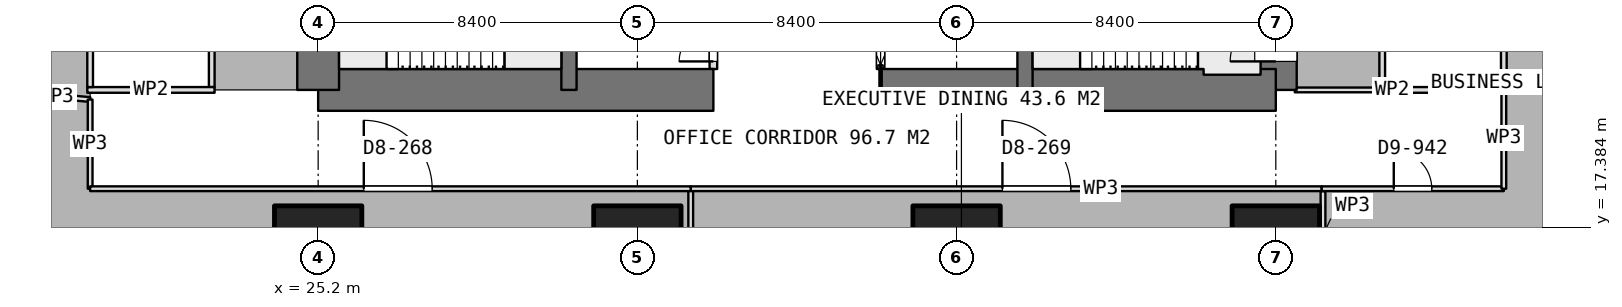
"""IFC4 building model, lengths in metres.
Left out: names, types, materials, properties, quantities, classifications, styles, units other than length and angle.
Written with IfcOpenShell. Run it as: python <this file> out.ifc"""

import sys

from ifc_helpers import new_model, si_unit, direction, frame, frame_2d, origin, origin_2d, place, context, subcontext, project, spatial, rectangle, extrude, element, fill, save


model = new_model("IFC4")
c1 = context("Model", 3, precision=1e-05, world=origin(), true_north=direction((0.0, 1.0)))
c2 = subcontext(c1, "Body", "Model", "MODEL_VIEW")
j1 = project(units=[si_unit("LENGTHUNIT", "METRE"), si_unit("PLANEANGLEUNIT", "RADIAN")], contexts=[c1])
p1 = place(None, origin())
s1 = spatial("IfcSite", under=j1, at=p1, CompositionType="ELEMENT")
p2 = place(p1, origin())
s2 = spatial("IfcBuilding", under=s1, at=p2, CompositionType="ELEMENT")
p3 = place(p2, frame((0.0, 0.0, 250.1)))
s3 = spatial("IfcBuildingStorey", under=s2, at=p3, CompositionType="ELEMENT", Elevation=250.1)
p4 = place(p3, frame((25.2, 21.0, 0.0), z_axis=(0.0, 0.0, 1.0), x_axis=(1.0, 0.0, 0.0)))
e1 = element("IfcWall", 1, at=p4, inside=s3, PredefinedType="SHEAR", context=c2, shape_type="SweptSolid", body=[
    extrude(rectangle(XDim=10.4, YDim=1.1, at=frame_2d((5.2, 0.0))), origin(), (0.0, 0.0, 1.0), 3.75),
])
p5 = place(p3, frame((40.0, 21.0, 0.0), z_axis=(0.0, 0.0, 1.0), x_axis=(1.0, 0.0, 0.0)))
e2 = element("IfcWall", 2, at=p5, inside=s3, PredefinedType="SHEAR", context=c2, shape_type="SweptSolid", body=[
    extrude(rectangle(XDim=10.4, YDim=1.1, at=frame_2d((5.2, 0.0))), origin(), (0.0, 0.0, 1.0), 3.75),
])
p6 = place(p3, frame((25.2, 21.0, 0.0), z_axis=(0.0, 0.0, 1.0), x_axis=(0.0, 1.0, 0.0)))
e3 = element("IfcWall", 3, at=p6, inside=s3, PredefinedType="SHEAR", context=c2, shape_type="SweptSolid", body=[
    extrude(rectangle(XDim=25.2, YDim=1.1, at=frame_2d((12.6, 0.0))), origin(), (0.0, 0.0, 1.0), 3.75),
])
p7 = place(p6, frame((7.8, 0.0, 0.0)))
e4 = element("IfcOpeningElement", 4, at=p7, cuts=e3, PredefinedType="OPENING", context=c2, shape_type="SweptSolid", body=[
    extrude(rectangle(XDim=1.2, YDim=2.1, at=frame_2d((0.6, 1.05))), frame((0.0, 0.56, 0.0), z_axis=(0.0, -1.0, 0.0), x_axis=(1.0, 0.0, 0.0)), (0.0, 0.0, 1.0), 1.12),
])
p8 = place(p6, frame((14.25, 0.0, 0.0)))
e5 = element("IfcOpeningElement", 5, at=p8, cuts=e3, PredefinedType="OPENING", context=c2, shape_type="SweptSolid", body=[
    extrude(rectangle(XDim=0.9, YDim=2.1, at=frame_2d((0.45, 1.05))), frame((0.0, 0.56, 0.0), z_axis=(0.0, -1.0, 0.0), x_axis=(1.0, 0.0, 0.0)), (0.0, 0.0, 1.0), 1.12),
])
p9 = place(p6, frame((16.85, 0.0, 0.0)))
e6 = element("IfcOpeningElement", 6, at=p9, cuts=e3, PredefinedType="OPENING", context=c2, shape_type="SweptSolid", body=[
    extrude(rectangle(XDim=0.9, YDim=2.1, at=frame_2d((0.45, 1.05))), frame((0.0, 0.56, 0.0), z_axis=(0.0, -1.0, 0.0), x_axis=(1.0, 0.0, 0.0)), (0.0, 0.0, 1.0), 1.12),
])
p10 = place(p6, frame((19.0, 0.0, 0.0)))
e7 = element("IfcOpeningElement", 7, at=p10, cuts=e3, PredefinedType="OPENING", context=c2, shape_type="SweptSolid", body=[
    extrude(rectangle(XDim=1.2, YDim=2.1, at=frame_2d((0.6, 1.05))), frame((0.0, 0.56, 0.0), z_axis=(0.0, -1.0, 0.0), x_axis=(1.0, 0.0, 0.0)), (0.0, 0.0, 1.0), 1.12),
])
p11 = place(p3, frame((50.4, 21.0, 0.0), z_axis=(0.0, 0.0, 1.0), x_axis=(0.0, 1.0, 0.0)))
e8 = element("IfcWall", 8, at=p11, inside=s3, PredefinedType="SHEAR", context=c2, shape_type="SweptSolid", body=[
    extrude(rectangle(XDim=25.2, YDim=1.1, at=frame_2d((12.6, 0.0))), origin(), (0.0, 0.0, 1.0), 3.75),
])
p12 = place(p11, frame((16.2, 0.0, 0.0)))
e9 = element("IfcOpeningElement", 9, at=p12, cuts=e8, PredefinedType="OPENING", context=c2, shape_type="SweptSolid", body=[
    extrude(rectangle(XDim=1.2, YDim=2.1, at=frame_2d((0.6, 1.05))), frame((0.0, 0.56, 0.0), z_axis=(0.0, -1.0, 0.0), x_axis=(1.0, 0.0, 0.0)), (0.0, 0.0, 1.0), 1.12),
])
p13 = place(p11, frame((10.05, 0.0, 0.0)))
e10 = element("IfcOpeningElement", 10, at=p13, cuts=e8, PredefinedType="OPENING", context=c2, shape_type="SweptSolid", body=[
    extrude(rectangle(XDim=0.9, YDim=2.1, at=frame_2d((0.45, 1.05))), frame((0.0, 0.56, 0.0), z_axis=(0.0, -1.0, 0.0), x_axis=(1.0, 0.0, 0.0)), (0.0, 0.0, 1.0), 1.12),
])
p14 = place(p11, frame((7.45, 0.0, 0.0)))
e11 = element("IfcOpeningElement", 11, at=p14, cuts=e8, PredefinedType="OPENING", context=c2, shape_type="SweptSolid", body=[
    extrude(rectangle(XDim=0.9, YDim=2.1, at=frame_2d((0.45, 1.05))), frame((0.0, 0.56, 0.0), z_axis=(0.0, -1.0, 0.0), x_axis=(1.0, 0.0, 0.0)), (0.0, 0.0, 1.0), 1.12),
])
p15 = place(p11, frame((0.75, 0.0, 0.0)))
e12 = element("IfcOpeningElement", 12, at=p15, cuts=e8, PredefinedType="OPENING", context=c2, shape_type="SweptSolid", body=[
    extrude(rectangle(XDim=1.2, YDim=2.1, at=frame_2d((0.6, 1.05))), frame((0.0, 0.56, 0.0), z_axis=(0.0, -1.0, 0.0), x_axis=(1.0, 0.0, 0.0)), (0.0, 0.0, 1.0), 1.12),
])
for number, where, z_axis, x_axis in (
    (13, (31.8, 21.0, 0.0), (0.0, 0.0, 1.0), (0.0, 1.0, 0.0)),
    (14, (43.8, 21.0, 0.0), (0.0, 0.0, 1.0), (0.0, 1.0, 0.0)),
):
    element("IfcWall", number, at=place(p3, frame(where, z_axis=z_axis, x_axis=x_axis)), inside=s3, PredefinedType="SHEAR", context=c2, shape_type="SweptSolid", body=[
        extrude(rectangle(XDim=25.2, YDim=0.4, at=frame_2d((12.6, 0.0))), origin(), (0.0, 0.0, 1.0), 3.75),
    ])
for number, where, z_axis, x_axis in (
    (15, (25.2, 16.8, 0.0), (0.0, 0.0, 1.0), (1.0, 0.0, 0.0)),
    (16, (33.6, 16.8, 0.0), (0.0, 0.0, 1.0), (1.0, 0.0, 0.0)),
    (17, (42.0, 16.8, 0.0), (0.0, 0.0, 1.0), (1.0, 0.0, 0.0)),
    (18, (50.4, 16.8, 0.0), (0.0, 0.0, 1.0), (1.0, 0.0, 0.0)),
):
    element("IfcColumn", number, at=place(p3, frame(where, z_axis=z_axis, x_axis=x_axis)), inside=s3, PredefinedType="COLUMN", context=c2, shape_type="SweptSolid", body=[
        extrude(rectangle(XDim=2.3, YDim=2.3, at=origin_2d()), origin(), (0.0, 0.0, 1.0), 3.75),
    ])
p16 = place(p3, frame((40.0, 21.55, 0.0), z_axis=(0.0, 0.0, 1.0), x_axis=(0.0, 1.0, 0.0)))
e19 = element("IfcWall", 19, at=p16, inside=s3, PredefinedType="PARTITIONING", context=c2, shape_type="SweptSolid", body=[
    extrude(rectangle(XDim=1.65, YDim=0.2, at=frame_2d((0.825, 0.0))), origin(), (0.0, 0.0, 1.0), 3.5),
])
p17 = place(p16, frame((0.1, 0.0, 0.0)))
e20 = element("IfcOpeningElement", 20, at=p17, cuts=e19, PredefinedType="OPENING", context=c2, shape_type="SweptSolid", body=[
    extrude(rectangle(XDim=1.1, YDim=2.1, at=frame_2d((0.55, 1.05))), frame((0.0, 0.11, 0.0), z_axis=(0.0, -1.0, 0.0), x_axis=(1.0, 0.0, 0.0)), (0.0, 0.0, 1.0), 0.22),
])
p18 = place(p3, frame((35.6, 21.55, 0.0), z_axis=(0.0, 0.0, 1.0), x_axis=(0.0, 1.0, 0.0)))
e21 = element("IfcWall", 21, at=p18, inside=s3, PredefinedType="PARTITIONING", context=c2, shape_type="SweptSolid", body=[
    extrude(rectangle(XDim=1.65, YDim=0.2, at=frame_2d((0.825, 0.0))), origin(), (0.0, 0.0, 1.0), 3.5),
])
p19 = place(p18, frame((0.2, 0.0, 0.0)))
e22 = element("IfcOpeningElement", 22, at=p19, cuts=e21, PredefinedType="OPENING", context=c2, shape_type="SweptSolid", body=[
    extrude(rectangle(XDim=0.9, YDim=2.1, at=frame_2d((0.45, 1.05))), frame((0.0, 0.11, 0.0), z_axis=(0.0, -1.0, 0.0), x_axis=(1.0, 0.0, 0.0)), (0.0, 0.0, 1.0), 0.22),
])
p20 = place(p3, frame((19.125, 21.0, 0.0), z_axis=(0.0, 0.0, 1.0), x_axis=(1.0, 0.0, 0.0)))
e23 = element("IfcWall", 23, at=p20, inside=s3, PredefinedType="PARTITIONING", context=c2, shape_type="SweptSolid", body=[
    extrude(rectangle(XDim=3.35, YDim=0.15, at=frame_2d((1.675, 0.0))), origin(), (0.0, 0.0, 1.0), 3.5),
])
p21 = place(p3, frame((19.2, 21.075, 0.0), z_axis=(0.0, 0.0, 1.0), x_axis=(0.0, 1.0, 0.0)))
e24 = element("IfcWall", 24, at=p21, inside=s3, PredefinedType="PARTITIONING", context=c2, shape_type="SweptSolid", body=[
    extrude(rectangle(XDim=6.85, YDim=0.15, at=frame_2d((3.425, 0.0))), origin(), (0.0, 0.0, 1.0), 3.5),
])
p22 = place(p3, frame((22.4, 21.075, 0.0), z_axis=(0.0, 0.0, 1.0), x_axis=(0.0, 1.0, 0.0)))
e25 = element("IfcWall", 25, at=p22, inside=s3, PredefinedType="PARTITIONING", context=c2, shape_type="SweptSolid", body=[
    extrude(rectangle(XDim=6.85, YDim=0.15, at=frame_2d((3.425, 0.0))), origin(), (0.0, 0.0, 1.0), 3.5),
])
p23 = place(p22, frame((2.925, 0.0, 0.0)))
e26 = element("IfcOpeningElement", 26, at=p23, cuts=e25, PredefinedType="OPENING", context=c2, shape_type="SweptSolid", body=[
    extrude(rectangle(XDim=1.0, YDim=2.1, at=frame_2d((0.5, 1.05))), frame((0.0, 0.085, 0.0), z_axis=(0.0, -1.0, 0.0), x_axis=(1.0, 0.0, 0.0)), (0.0, 0.0, 1.0), 0.17),
])
p24 = place(p3, frame((53.125, 21.0, 0.0), z_axis=(0.0, 0.0, 1.0), x_axis=(1.0, 0.0, 0.0)))
e27 = element("IfcWall", 27, at=p24, inside=s3, PredefinedType="PARTITIONING", context=c2, shape_type="SweptSolid", body=[
    extrude(rectangle(XDim=3.35, YDim=0.15, at=frame_2d((1.675, 0.0))), origin(), (0.0, 0.0, 1.0), 3.5),
])
p25 = place(p3, frame((53.2, 21.075, 0.0), z_axis=(0.0, 0.0, 1.0), x_axis=(0.0, 1.0, 0.0)))
e28 = element("IfcWall", 28, at=p25, inside=s3, PredefinedType="PARTITIONING", context=c2, shape_type="SweptSolid", body=[
    extrude(rectangle(XDim=6.85, YDim=0.15, at=frame_2d((3.425, 0.0))), origin(), (0.0, 0.0, 1.0), 3.5),
])
p26 = place(p25, frame((2.925, 0.0, 0.0)))
e29 = element("IfcOpeningElement", 29, at=p26, cuts=e28, PredefinedType="OPENING", context=c2, shape_type="SweptSolid", body=[
    extrude(rectangle(XDim=1.0, YDim=2.1, at=frame_2d((0.5, 1.05))), frame((0.0, 0.085, 0.0), z_axis=(0.0, -1.0, 0.0), x_axis=(1.0, 0.0, 0.0)), (0.0, 0.0, 1.0), 0.17),
])
p27 = place(p3, frame((56.4, 21.075, 0.0), z_axis=(0.0, 0.0, 1.0), x_axis=(0.0, 1.0, 0.0)))
e30 = element("IfcWall", 30, at=p27, inside=s3, PredefinedType="PARTITIONING", context=c2, shape_type="SweptSolid", body=[
    extrude(rectangle(XDim=6.85, YDim=0.15, at=frame_2d((3.425, 0.0))), origin(), (0.0, 0.0, 1.0), 3.5),
])
p28 = place(p3, frame((53.124, 21.0, 0.0), z_axis=(0.0, 0.0, 1.0), x_axis=(-1.0, 0.0, 0.0)))
e31 = element("IfcWall", 31, at=p28, inside=s3, PredefinedType="PARTITIONING", context=c2, shape_type="SweptSolid", body=[
    extrude(rectangle(XDim=2.224, YDim=0.125, at=frame_2d((1.112, 0.0))), origin(), (0.0, 0.0, 1.0), 3.5),
])
p29 = place(p3, frame((35.004, 15.087, 0.0), z_axis=(0.0, 0.0, 1.0), x_axis=(0.0, 1.0, 0.0)))
e32 = element("IfcWall", 32, at=p29, inside=s3, PredefinedType="PARTITIONING", context=c2, shape_type="SweptSolid", body=[
    extrude(rectangle(XDim=3.313, YDim=0.125, at=frame_2d((1.656, 0.0))), origin(), (0.0, 0.0, 1.0), 3.5),
])
p30 = place(p3, frame((35.004, 18.4, 0.0), z_axis=(0.0, 0.0, 1.0), x_axis=(1.0, 0.0, 0.0)))
e33 = element("IfcWall", 33, at=p30, inside=s3, PredefinedType="PARTITIONING", context=c2, shape_type="SweptSolid", body=[
    extrude(rectangle(XDim=16.604, YDim=0.125, at=frame_2d((8.302, 0.0))), origin(), (0.0, 0.0, 1.0), 3.5),
])
p31 = place(p30, frame((8.202, 0.0, 0.0)))
e34 = element("IfcOpeningElement", 34, at=p31, cuts=e33, PredefinedType="OPENING", context=c2, shape_type="SweptSolid", body=[
    extrude(rectangle(XDim=1.8, YDim=2.1, at=frame_2d((0.9, 1.05))), frame((0.0, 0.073, 0.0), z_axis=(0.0, -1.0, 0.0), x_axis=(1.0, 0.0, 0.0)), (0.0, 0.0, 1.0), 0.145),
])
p32 = place(p3, frame((51.642, 18.337, 0.0), z_axis=(0.0, 0.0, 1.0), x_axis=(0.0, -1.0, 0.0)))
e35 = element("IfcWall", 35, at=p32, inside=s3, PredefinedType="PARTITIONING", context=c2, shape_type="SweptSolid", body=[
    extrude(rectangle(XDim=2.314, YDim=0.125, at=frame_2d((1.157, 0.0))), origin(), (0.0, 0.0, 1.0), 3.5),
])
p33 = place(p3, frame((51.608, 18.4, 0.0), z_axis=(0.0, 0.0, 1.0), x_axis=(1.0, 0.0, 0.0)))
e36 = element("IfcWall", 36, at=p33, inside=s3, PredefinedType="PARTITIONING", context=c2, shape_type="SweptSolid", body=[
    extrude(rectangle(XDim=4.792, YDim=0.125, at=frame_2d((2.396, 0.0))), origin(), (0.0, 0.0, 1.0), 3.5),
])
p34 = place(p33, frame((1.896, 0.0, 0.0)))
e37 = element("IfcOpeningElement", 37, at=p34, cuts=e36, PredefinedType="OPENING", context=c2, shape_type="SweptSolid", body=[
    extrude(rectangle(XDim=1.0, YDim=2.1, at=frame_2d((0.5, 1.05))), frame((0.0, 0.073, 0.0), z_axis=(0.0, -1.0, 0.0), x_axis=(1.0, 0.0, 0.0)), (0.0, 0.0, 1.0), 0.145),
])
p35 = place(p3, frame((56.4, 18.4, 0.0), z_axis=(0.0, 0.0, 1.0), x_axis=(0.0, 1.0, 0.0)))
e38 = element("IfcWall", 38, at=p35, inside=s3, PredefinedType="PARTITIONING", context=c2, shape_type="SweptSolid", body=[
    extrude(rectangle(XDim=2.675, YDim=0.125, at=frame_2d((1.337, 0.0))), origin(), (0.0, 0.0, 1.0), 3.5),
])
p36 = place(p3, frame((16.666, 20.972, 0.0), z_axis=(0.0, 0.0, 1.0), x_axis=(0.996085983525, -0.08838955495, 0.0)))
e39 = element("IfcWall", 39, at=p36, inside=s3, PredefinedType="PARTITIONING", context=c2, shape_type="SweptSolid", body=[
    extrude(rectangle(XDim=2.544, YDim=0.125, at=frame_2d((1.272, 0.0))), origin(), (0.0, 0.0, 1.0), 3.5),
])
p37 = place(p3, frame((19.2, 20.747, 0.0), z_axis=(0.0, 0.0, 1.0), x_axis=(0.0, -1.0, 0.0)))
e40 = element("IfcWall", 40, at=p37, inside=s3, PredefinedType="PARTITIONING", context=c2, shape_type="SweptSolid", body=[
    extrude(rectangle(XDim=2.347, YDim=0.125, at=frame_2d((1.174, 0.0))), origin(), (0.0, 0.0, 1.0), 3.5),
])
p38 = place(p3, frame((19.2, 18.4, 0.0), z_axis=(0.0, 0.0, 1.0), x_axis=(1.0, 0.0, 0.0)))
e41 = element("IfcWall", 41, at=p38, inside=s3, PredefinedType="PARTITIONING", context=c2, shape_type="SweptSolid", body=[
    extrude(rectangle(XDim=15.803, YDim=0.125, at=frame_2d((7.901, 0.0))), origin(), (0.0, 0.0, 1.0), 3.5),
])
p39 = place(p38, frame((7.201, 0.0, 0.0)))
e42 = element("IfcOpeningElement", 42, at=p39, cuts=e41, PredefinedType="OPENING", context=c2, shape_type="SweptSolid", body=[
    extrude(rectangle(XDim=1.8, YDim=2.1, at=frame_2d((0.9, 1.05))), frame((0.0, 0.073, 0.0), z_axis=(0.0, -1.0, 0.0), x_axis=(1.0, 0.0, 0.0)), (0.0, 0.0, 1.0), 0.145),
])
p40 = place(p17, origin())
e43 = element("IfcDoor", 43, at=p40, inside=s3, OperationType="SLIDING_TO_LEFT", PredefinedType="DOOR", context=c2, shape_type="SweptSolid", body=[
    extrude(rectangle(XDim=1.1, YDim=2.1, at=frame_2d((0.55, 1.05))), frame((0.0, 0.025, 0.0), z_axis=(0.0, -1.0, 0.0), x_axis=(1.0, 0.0, 0.0)), (0.0, 0.0, 1.0), 0.05),
])
fill(e20, e43)
p41 = place(p19, origin())
e44 = element("IfcDoor", 44, at=p41, inside=s3, OperationType="SINGLE_SWING_LEFT", PredefinedType="DOOR", context=c2, shape_type="SweptSolid", body=[
    extrude(rectangle(XDim=0.9, YDim=2.1, at=frame_2d((0.45, 1.05))), frame((0.0, 0.025, 0.0), z_axis=(0.0, -1.0, 0.0), x_axis=(1.0, 0.0, 0.0)), (0.0, 0.0, 1.0), 0.05),
])
fill(e22, e44)
p42 = place(p31, origin())
e45 = element("IfcDoor", 45, at=p42, inside=s3, OperationType="DOUBLE_DOOR_SINGLE_SWING", PredefinedType="DOOR", context=c2, shape_type="SweptSolid", body=[
    extrude(rectangle(XDim=1.8, YDim=2.1, at=frame_2d((0.9, 1.05))), frame((0.0, 0.025, 0.0), z_axis=(0.0, -1.0, 0.0), x_axis=(1.0, 0.0, 0.0)), (0.0, 0.0, 1.0), 0.05),
])
fill(e34, e45)
p43 = place(p34, origin())
e46 = element("IfcDoor", 46, at=p43, inside=s3, OperationType="SINGLE_SWING_LEFT", PredefinedType="DOOR", context=c2, shape_type="SweptSolid", body=[
    extrude(rectangle(XDim=1.0, YDim=2.1, at=frame_2d((0.5, 1.05))), frame((0.0, 0.025, 0.0), z_axis=(0.0, -1.0, 0.0), x_axis=(1.0, 0.0, 0.0)), (0.0, 0.0, 1.0), 0.05),
])
fill(e37, e46)
p44 = place(p39, origin())
e47 = element("IfcDoor", 47, at=p44, inside=s3, OperationType="DOUBLE_DOOR_SINGLE_SWING", PredefinedType="DOOR", context=c2, shape_type="SweptSolid", body=[
    extrude(rectangle(XDim=1.8, YDim=2.1, at=frame_2d((0.9, 1.05))), frame((0.0, 0.025, 0.0), z_axis=(0.0, -1.0, 0.0), x_axis=(1.0, 0.0, 0.0)), (0.0, 0.0, 1.0), 0.05),
])
fill(e42, e47)
p45 = place(p15, origin())
e48 = element("IfcDoor", 48, at=p45, inside=s3, OperationType="SINGLE_SWING_RIGHT", PredefinedType="DOOR", context=c2, shape_type="SweptSolid", body=[
    extrude(rectangle(XDim=1.2, YDim=2.1, at=frame_2d((0.6, 1.05))), frame((0.0, 0.025, 0.0), z_axis=(0.0, -1.0, 0.0), x_axis=(1.0, 0.0, 0.0)), (0.0, 0.0, 1.0), 0.05),
])
fill(e12, e48)
save(model, sys.argv[1])
